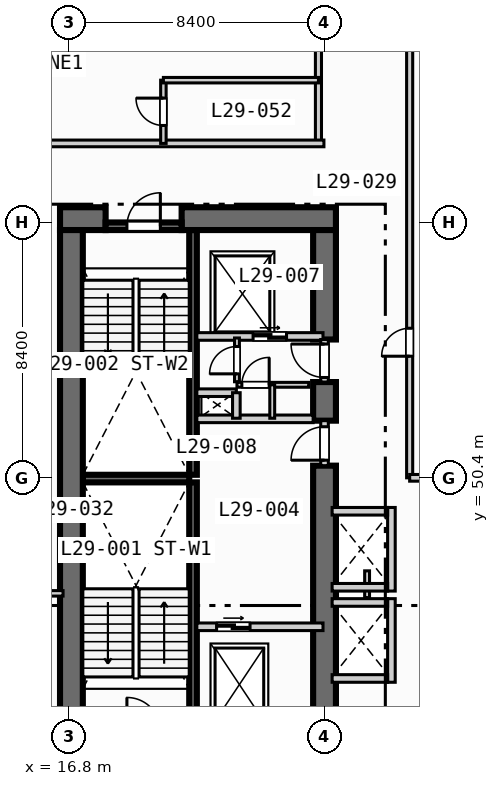
"""IFC4 building model, lengths in metres.
Left out: names, types, materials, properties, quantities, classifications, styles, units other than length and angle.
Written with IfcOpenShell. Run it as: python <this file> out.ifc"""

import sys

from ifc_helpers import new_model, si_unit, direction, frame, frame_2d, origin, place, context, subcontext, project, spatial, rectangle, extrude, element, fill, save


model = new_model("IFC4")
c1 = context("Model", 3, precision=1e-05, world=origin(), true_north=direction((0.0, 1.0)))
c2 = subcontext(c1, "Body", "Model", "MODEL_VIEW")
j1 = project(units=[si_unit("LENGTHUNIT", "METRE"), si_unit("PLANEANGLEUNIT", "RADIAN")], contexts=[c1])
p1 = place(None, origin())
s1 = spatial("IfcSite", under=j1, at=p1, CompositionType="ELEMENT")
p2 = place(p1, origin())
s2 = spatial("IfcBuilding", under=s1, at=p2, CompositionType="ELEMENT")
p3 = place(p2, frame((0.0, 0.0, 122.8)))
s3 = spatial("IfcBuildingStorey", under=s2, at=p3, CompositionType="ELEMENT", Elevation=122.8)
for number, where, z_axis, x_axis in (
    (1, (20.875, 42.2, 0.0), (0.0, 0.0, 1.0), (0.0, 1.0, 0.0)),
    (2, (20.875, 50.5, 0.0), (0.0, 0.0, 1.0), (0.0, 1.0, 0.0)),
):
    element("IfcWall", number, at=place(p3, frame(where, z_axis=z_axis, x_axis=x_axis)), inside=s3, PredefinedType="SOLIDWALL", context=c2, shape_type="SweptSolid", body=[
        extrude(rectangle(XDim=8.05, YDim=0.25, at=frame_2d((4.025, 0.0))), origin(), (0.0, 0.0, 1.0), 3.55),
    ])
p4 = place(p3, frame((17.25, 50.375, 0.0), z_axis=(0.0, 0.0, 1.0), x_axis=(1.0, 0.0, 0.0)))
e3 = element("IfcWall", 3, at=p4, inside=s3, PredefinedType="SOLIDWALL", context=c2, shape_type="SweptSolid", body=[
    extrude(rectangle(XDim=3.5, YDim=0.25, at=frame_2d((1.75, 0.0))), origin(), (0.0, 0.0, 1.0), 3.55),
])
p5 = place(p3, frame((16.5, 58.925, 0.0), z_axis=(0.0, 0.0, 1.0), x_axis=(1.0, 0.0, 0.0)))
e4 = element("IfcWall", 4, at=p5, inside=s3, PredefinedType="SHEAR", context=c2, shape_type="SweptSolid", body=[
    extrude(rectangle(XDim=1.5, YDim=0.75, at=frame_2d((0.75, 0.0))), origin(), (0.0, 0.0, 1.0), 3.55),
])
p6 = place(p3, frame((20.5, 58.925, 0.0), z_axis=(0.0, 0.0, 1.0), x_axis=(1.0, 0.0, 0.0)))
e5 = element("IfcWall", 5, at=p6, inside=s3, PredefinedType="SHEAR", context=c2, shape_type="SweptSolid", body=[
    extrude(rectangle(XDim=5.075, YDim=0.75, at=frame_2d((2.538, 0.0))), origin(), (0.0, 0.0, 1.0), 3.55),
])
p7 = place(p3, frame((16.875, 42.2, 0.0), z_axis=(0.0, 0.0, 1.0), x_axis=(0.0, 1.0, 0.0)))
e6 = element("IfcWall", 6, at=p7, inside=s3, PredefinedType="SHEAR", context=c2, shape_type="SweptSolid", body=[
    extrude(rectangle(XDim=16.35, YDim=0.75, at=frame_2d((8.175, 0.0))), origin(), (0.0, 0.0, 1.0), 3.55),
])
p8 = place(p3, frame((25.2, 42.2, 0.0), z_axis=(0.0, 0.0, 1.0), x_axis=(0.0, 1.0, 0.0)))
e7 = element("IfcWall", 7, at=p8, inside=s3, PredefinedType="SHEAR", context=c2, shape_type="SweptSolid", body=[
    extrude(rectangle(XDim=8.6, YDim=0.75, at=frame_2d((4.3, 0.0))), origin(), (0.0, 0.0, 1.0), 3.55),
])
p9 = place(p3, frame((25.2, 52.28, 0.0), z_axis=(0.0, 0.0, 1.0), x_axis=(0.0, 1.0, 0.0)))
e8 = element("IfcWall", 8, at=p9, inside=s3, PredefinedType="SHEAR", context=c2, shape_type="SweptSolid", body=[
    extrude(rectangle(XDim=1.27, YDim=0.75, at=frame_2d((0.635, 0.0))), origin(), (0.0, 0.0, 1.0), 3.55),
])
p10 = place(p3, frame((25.2, 54.95, 0.0), z_axis=(0.0, 0.0, 1.0), x_axis=(0.0, 1.0, 0.0)))
e9 = element("IfcWall", 9, at=p10, inside=s3, PredefinedType="SHEAR", context=c2, shape_type="SweptSolid", body=[
    extrude(rectangle(XDim=3.6, YDim=0.75, at=frame_2d((1.8, 0.0))), origin(), (0.0, 0.0, 1.0), 3.55),
])
p11 = place(p3, frame((18.0, 58.675, 0.0), z_axis=(0.0, 0.0, 1.0), x_axis=(1.0, 0.0, 0.0)))
e10 = element("IfcWall", 10, at=p11, inside=s3, PredefinedType="SOLIDWALL", context=c2, shape_type="SweptSolid", body=[
    extrude(rectangle(XDim=2.5, YDim=0.25, at=frame_2d((1.25, 0.0))), origin(), (0.0, 0.0, 1.0), 3.55),
])
p12 = place(p11, frame((0.7, 0.0, 0.0)))
e11 = element("IfcOpeningElement", 11, at=p12, cuts=e10, PredefinedType="OPENING", context=c2, shape_type="SweptSolid", body=[
    extrude(rectangle(XDim=1.1, YDim=2.15, at=frame_2d((0.55, 1.075))), frame((0.0, 0.135, 0.0), z_axis=(0.0, -1.0, 0.0), x_axis=(1.0, 0.0, 0.0)), (0.0, 0.0, 1.0), 0.27),
])
p13 = place(p3, frame((21.0, 45.5, 0.0), z_axis=(0.0, 0.0, 1.0), x_axis=(1.0, 0.0, 0.0)))
e12 = element("IfcWall", 12, at=p13, inside=s3, PredefinedType="SOLIDWALL", context=c2, shape_type="SweptSolid", body=[
    extrude(rectangle(XDim=4.15, YDim=0.25, at=frame_2d((2.075, 0.0))), origin(), (0.0, 0.0, 1.0), 3.55),
])
p14 = place(p13, frame((0.65, 0.0, 0.0)))
e13 = element("IfcOpeningElement", 13, at=p14, cuts=e12, PredefinedType="OPENING", context=c2, shape_type="SweptSolid", body=[
    extrude(rectangle(XDim=1.1, YDim=2.15, at=frame_2d((0.55, 1.075))), frame((0.0, 0.135, 0.0), z_axis=(0.0, -1.0, 0.0), x_axis=(1.0, 0.0, 0.0)), (0.0, 0.0, 1.0), 0.27),
])
p15 = place(p3, frame((25.2, 50.8, 0.0), z_axis=(0.0, 0.0, 1.0), x_axis=(0.0, 1.0, 0.0)))
e14 = element("IfcWall", 14, at=p15, inside=s3, PredefinedType="SOLIDWALL", context=c2, shape_type="SweptSolid", body=[
    extrude(rectangle(XDim=1.48, YDim=0.25, at=frame_2d((0.74, 0.0))), origin(), (0.0, 0.0, 1.0), 3.55),
])
p16 = place(p15, frame((0.18, 0.0, 0.0)))
e15 = element("IfcOpeningElement", 15, at=p16, cuts=e14, PredefinedType="OPENING", context=c2, shape_type="SweptSolid", body=[
    extrude(rectangle(XDim=1.1, YDim=2.15, at=frame_2d((0.55, 1.075))), frame((0.0, 0.135, 0.0), z_axis=(0.0, -1.0, 0.0), x_axis=(1.0, 0.0, 0.0)), (0.0, 0.0, 1.0), 0.27),
])
p17 = place(p3, frame((21.0, 52.34, 0.0), z_axis=(0.0, 0.0, 1.0), x_axis=(1.0, 0.0, 0.0)))
e16 = element("IfcWall", 16, at=p17, inside=s3, PredefinedType="SOLIDWALL", context=c2, shape_type="SweptSolid", body=[
    extrude(rectangle(XDim=3.825, YDim=0.25, at=frame_2d((1.913, 0.0))), origin(), (0.0, 0.0, 1.0), 3.55),
])
p18 = place(p3, frame((21.0, 55.05, 0.0), z_axis=(0.0, 0.0, 1.0), x_axis=(1.0, 0.0, 0.0)))
e17 = element("IfcWall", 17, at=p18, inside=s3, PredefinedType="SOLIDWALL", context=c2, shape_type="SweptSolid", body=[
    extrude(rectangle(XDim=4.15, YDim=0.25, at=frame_2d((2.075, 0.0))), origin(), (0.0, 0.0, 1.0), 3.55),
])
p19 = place(p18, frame((1.85, 0.0, 0.0)))
e18 = element("IfcOpeningElement", 18, at=p19, cuts=e17, PredefinedType="OPENING", context=c2, shape_type="SweptSolid", body=[
    extrude(rectangle(XDim=1.1, YDim=2.15, at=frame_2d((0.55, 1.075))), frame((0.0, 0.135, 0.0), z_axis=(0.0, -1.0, 0.0), x_axis=(1.0, 0.0, 0.0)), (0.0, 0.0, 1.0), 0.27),
])
p20 = place(p3, frame((25.2, 53.55, 0.0), z_axis=(0.0, 0.0, 1.0), x_axis=(0.0, 1.0, 0.0)))
e19 = element("IfcWall", 19, at=p20, inside=s3, PredefinedType="SOLIDWALL", context=c2, shape_type="SweptSolid", body=[
    extrude(rectangle(XDim=1.4, YDim=0.25, at=frame_2d((0.7, 0.0))), origin(), (0.0, 0.0, 1.0), 3.55),
])
p21 = place(p20, frame((0.15, 0.0, 0.0)))
e20 = element("IfcOpeningElement", 20, at=p21, cuts=e19, PredefinedType="OPENING", context=c2, shape_type="SweptSolid", body=[
    extrude(rectangle(XDim=1.1, YDim=2.15, at=frame_2d((0.55, 1.075))), frame((0.0, 0.135, 0.0), z_axis=(0.0, -1.0, 0.0), x_axis=(1.0, 0.0, 0.0)), (0.0, 0.0, 1.0), 0.27),
])
p22 = place(p3, frame((21.0, 53.2, 0.0), z_axis=(0.0, 0.0, 1.0), x_axis=(1.0, 0.0, 0.0)))
e21 = element("IfcWall", 21, at=p22, inside=s3, PredefinedType="SOLIDWALL", context=c2, shape_type="SweptSolid", body=[
    extrude(rectangle(XDim=1.3, YDim=0.25, at=frame_2d((0.65, 0.0))), origin(), (0.0, 0.0, 1.0), 3.55),
])
p23 = place(p3, frame((22.3, 52.36, 0.0), z_axis=(0.0, 0.0, 1.0), x_axis=(0.0, 1.0, 0.0)))
e22 = element("IfcWall", 22, at=p23, inside=s3, PredefinedType="SOLIDWALL", context=c2, shape_type="SweptSolid", body=[
    extrude(rectangle(XDim=0.84, YDim=0.25, at=frame_2d((0.42, 0.0))), origin(), (0.0, 0.0, 1.0), 3.55),
])
p24 = place(p3, frame((22.32, 53.56, 0.0), z_axis=(0.0, 0.0, 1.0), x_axis=(0.0, 1.0, 0.0)))
e23 = element("IfcWall", 23, at=p24, inside=s3, PredefinedType="PARTITIONING", context=c2, shape_type="SweptSolid", body=[
    extrude(rectangle(XDim=1.44, YDim=0.16, at=frame_2d((0.72, 0.0))), origin(), (0.0, 0.0, 1.0), 3.55),
])
p25 = place(p24, frame((0.26, 0.0, 0.0)))
e24 = element("IfcOpeningElement", 24, at=p25, cuts=e23, PredefinedType="OPENING", context=c2, shape_type="SweptSolid", body=[
    extrude(rectangle(XDim=0.9, YDim=2.1, at=frame_2d((0.45, 1.05))), frame((0.0, 0.09, 0.0), z_axis=(0.0, -1.0, 0.0), x_axis=(1.0, 0.0, 0.0)), (0.0, 0.0, 1.0), 0.18),
])
p26 = place(p3, frame((22.32, 53.46, 0.0), z_axis=(0.0, 0.0, 1.0), x_axis=(1.0, 0.0, 0.0)))
e25 = element("IfcWall", 25, at=p26, inside=s3, PredefinedType="PARTITIONING", context=c2, shape_type="SweptSolid", body=[
    extrude(rectangle(XDim=2.36, YDim=0.16, at=frame_2d((1.18, 0.0))), origin(), (0.0, 0.0, 1.0), 3.55),
])
p27 = place(p26, frame((0.16, 0.0, 0.0)))
e26 = element("IfcOpeningElement", 26, at=p27, cuts=e25, PredefinedType="OPENING", context=c2, shape_type="SweptSolid", body=[
    extrude(rectangle(XDim=0.9, YDim=2.1, at=frame_2d((0.45, 1.05))), frame((0.0, 0.09, 0.0), z_axis=(0.0, -1.0, 0.0), x_axis=(1.0, 0.0, 0.0)), (0.0, 0.0, 1.0), 0.18),
])
p28 = place(p3, frame((23.48, 52.36, 0.0), z_axis=(0.0, 0.0, 1.0), x_axis=(0.0, 1.0, 0.0)))
e27 = element("IfcWall", 27, at=p28, inside=s3, PredefinedType="PARTITIONING", context=c2, shape_type="SweptSolid", body=[
    extrude(rectangle(XDim=1.1, YDim=0.16, at=frame_2d((0.55, 0.0))), origin(), (0.0, 0.0, 1.0), 3.55),
])
p29 = place(p3, frame((27.4, 43.675, 0.0), z_axis=(0.0, 0.0, 1.0), x_axis=(0.0, 1.0, 0.0)))
e28 = element("IfcWall", 28, at=p29, inside=s3, PredefinedType="SOLIDWALL", context=c2, shape_type="SweptSolid", body=[
    extrude(rectangle(XDim=2.75, YDim=0.25, at=frame_2d((1.375, 0.0))), origin(), (0.0, 0.0, 1.0), 3.55),
])
for number, where, z_axis, x_axis in (
    (29, (25.45, 43.8, 0.0), (0.0, 0.0, 1.0), (1.0, 0.0, 0.0)),
    (30, (25.45, 46.3, 0.0), (0.0, 0.0, 1.0), (1.0, 0.0, 0.0)),
):
    element("IfcWall", number, at=place(p3, frame(where, z_axis=z_axis, x_axis=x_axis)), inside=s3, PredefinedType="SOLIDWALL", context=c2, shape_type="SweptSolid", body=[
        extrude(rectangle(XDim=1.825, YDim=0.25, at=frame_2d((0.913, 0.0))), origin(), (0.0, 0.0, 1.0), 3.55),
    ])
p30 = place(p3, frame((26.6, 46.46, 0.0), z_axis=(0.0, 0.0, 1.0), x_axis=(0.0, 1.0, 0.0)))
e31 = element("IfcWall", 31, at=p30, inside=s3, PredefinedType="PARTITIONING", context=c2, shape_type="SweptSolid", body=[
    extrude(rectangle(XDim=0.88, YDim=0.16, at=frame_2d((0.44, 0.0))), origin(), (0.0, 0.0, 1.0), 3.55),
])
p31 = place(p3, frame((27.4, 46.675, 0.0), z_axis=(0.0, 0.0, 1.0), x_axis=(0.0, 1.0, 0.0)))
e32 = element("IfcWall", 32, at=p31, inside=s3, PredefinedType="SOLIDWALL", context=c2, shape_type="SweptSolid", body=[
    extrude(rectangle(XDim=2.75, YDim=0.25, at=frame_2d((1.375, 0.0))), origin(), (0.0, 0.0, 1.0), 3.55),
])
for number, where, z_axis, x_axis in (
    (33, (25.45, 46.8, 0.0), (0.0, 0.0, 1.0), (1.0, 0.0, 0.0)),
    (34, (25.45, 49.3, 0.0), (0.0, 0.0, 1.0), (1.0, 0.0, 0.0)),
):
    element("IfcWall", number, at=place(p3, frame(where, z_axis=z_axis, x_axis=x_axis)), inside=s3, PredefinedType="SOLIDWALL", context=c2, shape_type="SweptSolid", body=[
        extrude(rectangle(XDim=1.825, YDim=0.25, at=frame_2d((0.913, 0.0))), origin(), (0.0, 0.0, 1.0), 3.55),
    ])
p32 = place(p3, frame((0.35, 49.2, 0.0), z_axis=(0.0, 0.0, 1.0), x_axis=(1.0, 0.0, 0.0)))
e35 = element("IfcWall", 35, at=p32, inside=s3, PredefinedType="PARTITIONING", context=c2, shape_type="SweptSolid", body=[
    extrude(rectangle(XDim=16.25, YDim=0.22, at=frame_2d((8.125, 0.0))), origin(), (0.0, 0.0, 1.0), 3.55),
])
p33 = place(p3, frame((13.6, 46.6, 0.0), z_axis=(0.0, 0.0, 1.0), x_axis=(1.0, 0.0, 0.0)))
e36 = element("IfcWall", 36, at=p33, inside=s3, PredefinedType="PLUMBINGWALL", context=c2, shape_type="SweptSolid", body=[
    extrude(rectangle(XDim=3.0, YDim=0.18, at=frame_2d((1.5, 0.0))), origin(), (0.0, 0.0, 1.0), 3.55),
])
p34 = place(p3, frame((25.0, 61.4, 0.0), z_axis=(0.0, 0.0, 1.0), x_axis=(0.0, 1.0, 0.0)))
e37 = element("IfcWall", 37, at=p34, inside=s3, PredefinedType="PARTITIONING", context=c2, shape_type="SweptSolid", body=[
    extrude(rectangle(XDim=27.6, YDim=0.2, at=frame_2d((13.8, 0.0))), origin(), (0.0, 0.0, 1.0), 2.8),
])
p35 = place(p34, frame((3.18, 0.0, 0.0)))
e38 = element("IfcOpeningElement", 38, at=p35, cuts=e37, PredefinedType="OPENING", context=c2, shape_type="SweptSolid", body=[
    extrude(rectangle(XDim=1.0, YDim=2.15, at=frame_2d((0.5, 1.075))), frame((0.0, 0.11, 0.0), z_axis=(0.0, -1.0, 0.0), x_axis=(1.0, 0.0, 0.0)), (0.0, 0.0, 1.0), 0.22),
])
p36 = place(p34, frame((6.97, 0.0, 0.0)))
e39 = element("IfcOpeningElement", 39, at=p36, cuts=e37, PredefinedType="OPENING", context=c2, shape_type="SweptSolid", body=[
    extrude(rectangle(XDim=1.0, YDim=2.15, at=frame_2d((0.5, 1.075))), frame((0.0, 0.11, 0.0), z_axis=(0.0, -1.0, 0.0), x_axis=(1.0, 0.0, 0.0)), (0.0, 0.0, 1.0), 0.22),
])
p37 = place(p34, frame((12.035, 0.0, 0.0)))
e40 = element("IfcOpeningElement", 40, at=p37, cuts=e37, PredefinedType="OPENING", context=c2, shape_type="SweptSolid", body=[
    extrude(rectangle(XDim=1.0, YDim=2.15, at=frame_2d((0.5, 1.075))), frame((0.0, 0.11, 0.0), z_axis=(0.0, -1.0, 0.0), x_axis=(1.0, 0.0, 0.0)), (0.0, 0.0, 1.0), 0.22),
])
p38 = place(p34, frame((20.385, 0.0, 0.0)))
e41 = element("IfcOpeningElement", 41, at=p38, cuts=e37, PredefinedType="OPENING", context=c2, shape_type="SweptSolid", body=[
    extrude(rectangle(XDim=1.0, YDim=2.15, at=frame_2d((0.5, 1.075))), frame((0.0, 0.11, 0.0), z_axis=(0.0, -1.0, 0.0), x_axis=(1.0, 0.0, 0.0)), (0.0, 0.0, 1.0), 0.22),
])
p39 = place(p3, frame((0.2, 61.4, 0.0), z_axis=(0.0, 0.0, 1.0), x_axis=(1.0, 0.0, 0.0)))
e42 = element("IfcWall", 42, at=p39, inside=s3, PredefinedType="PARTITIONING", context=c2, shape_type="SweptSolid", body=[
    extrude(rectangle(XDim=24.98, YDim=0.22, at=frame_2d((12.49, 0.0))), origin(), (0.0, 0.0, 1.0), 3.55),
])
p40 = place(p3, frame((19.9, 61.4, 0.0), z_axis=(0.0, 0.0, 1.0), x_axis=(0.0, 1.0, 0.0)))
e43 = element("IfcWall", 43, at=p40, inside=s3, PredefinedType="PLUMBINGWALL", context=c2, shape_type="SweptSolid", body=[
    extrude(rectangle(XDim=2.08, YDim=0.18, at=frame_2d((1.04, 0.0))), origin(), (0.0, 0.0, 1.0), 3.55),
])
p41 = place(p40, frame((0.59, 0.0, 0.0)))
e44 = element("IfcOpeningElement", 44, at=p41, cuts=e43, PredefinedType="OPENING", context=c2, shape_type="SweptSolid", body=[
    extrude(rectangle(XDim=0.9, YDim=2.1, at=frame_2d((0.45, 1.05))), frame((0.0, 0.1, 0.0), z_axis=(0.0, -1.0, 0.0), x_axis=(1.0, 0.0, 0.0)), (0.0, 0.0, 1.0), 0.2),
])
p42 = place(p3, frame((19.9, 63.48, 0.0), z_axis=(0.0, 0.0, 1.0), x_axis=(1.0, 0.0, 0.0)))
e45 = element("IfcWall", 45, at=p42, inside=s3, PredefinedType="PLUMBINGWALL", context=c2, shape_type="SweptSolid", body=[
    extrude(rectangle(XDim=5.1, YDim=0.18, at=frame_2d((2.55, 0.0))), origin(), (0.0, 0.0, 1.0), 3.55),
])
p43 = place(p3, frame((28.0, 50.4, 0.0), z_axis=(0.0, 0.0, 1.0), x_axis=(0.0, 1.0, 0.0)))
e46 = element("IfcWall", 46, at=p43, inside=s3, PredefinedType="PARTITIONING", context=c2, shape_type="SweptSolid", body=[
    extrude(rectangle(XDim=38.6, YDim=0.2, at=frame_2d((19.3, 0.0))), origin(), (0.0, 0.0, 1.0), 3.55),
])
p44 = place(p43, frame((4.0, 0.0, 0.0)))
e47 = element("IfcOpeningElement", 47, at=p44, cuts=e46, PredefinedType="OPENING", context=c2, shape_type="SweptSolid", body=[
    extrude(rectangle(XDim=0.92, YDim=2.1, at=frame_2d((0.46, 1.05))), frame((0.0, 0.11, 0.0), z_axis=(0.0, -1.0, 0.0), x_axis=(1.0, 0.0, 0.0)), (0.0, 0.0, 1.0), 0.22),
])
p45 = place(p3, frame((28.0, 50.4, 0.0), z_axis=(0.0, 0.0, 1.0), x_axis=(1.0, 0.0, 0.0)))
e48 = element("IfcWall", 48, at=p45, inside=s3, PredefinedType="PARTITIONING", context=c2, shape_type="SweptSolid", body=[
    extrude(rectangle(XDim=5.3, YDim=0.22, at=frame_2d((2.65, 0.0))), origin(), (0.0, 0.0, 1.0), 2.8),
])
p46 = place(p12, origin())
e49 = element("IfcDoor", 49, at=p46, inside=s3, OperationType="SINGLE_SWING_RIGHT", PredefinedType="DOOR", context=c2, shape_type="SweptSolid", body=[
    extrude(rectangle(XDim=1.1, YDim=2.15, at=frame_2d((0.55, 1.075))), frame((0.0, 0.025, 0.0), z_axis=(0.0, -1.0, 0.0), x_axis=(1.0, 0.0, 0.0)), (0.0, 0.0, 1.0), 0.05),
])
fill(e11, e49)
p47 = place(p14, origin())
e50 = element("IfcDoor", 50, at=p47, inside=s3, OperationType="SLIDING_TO_LEFT", PredefinedType="DOOR", context=c2, shape_type="SweptSolid", body=[
    extrude(rectangle(XDim=1.1, YDim=2.15, at=frame_2d((0.55, 1.075))), frame((0.0, 0.025, 0.0), z_axis=(0.0, -1.0, 0.0), x_axis=(1.0, 0.0, 0.0)), (0.0, 0.0, 1.0), 0.05),
])
fill(e13, e50)
p48 = place(p16, origin())
e51 = element("IfcDoor", 51, at=p48, inside=s3, OperationType="SINGLE_SWING_LEFT", PredefinedType="DOOR", context=c2, shape_type="SweptSolid", body=[
    extrude(rectangle(XDim=1.1, YDim=2.15, at=frame_2d((0.55, 1.075))), frame((0.0, 0.025, 0.0), z_axis=(0.0, -1.0, 0.0), x_axis=(1.0, 0.0, 0.0)), (0.0, 0.0, 1.0), 0.05),
])
fill(e15, e51)
p49 = place(p19, origin())
e52 = element("IfcDoor", 52, at=p49, inside=s3, OperationType="SLIDING_TO_LEFT", PredefinedType="DOOR", context=c2, shape_type="SweptSolid", body=[
    extrude(rectangle(XDim=1.1, YDim=2.15, at=frame_2d((0.55, 1.075))), frame((0.0, 0.025, 0.0), z_axis=(0.0, -1.0, 0.0), x_axis=(1.0, 0.0, 0.0)), (0.0, 0.0, 1.0), 0.05),
])
fill(e18, e52)
p50 = place(p21, origin())
e53 = element("IfcDoor", 53, at=p50, inside=s3, OperationType="SINGLE_SWING_RIGHT", PredefinedType="DOOR", context=c2, shape_type="SweptSolid", body=[
    extrude(rectangle(XDim=1.1, YDim=2.15, at=frame_2d((0.55, 1.075))), frame((0.0, 0.025, 0.0), z_axis=(0.0, -1.0, 0.0), x_axis=(1.0, 0.0, 0.0)), (0.0, 0.0, 1.0), 0.05),
])
fill(e20, e53)
p51 = place(p25, origin())
e54 = element("IfcDoor", 54, at=p51, inside=s3, OperationType="SINGLE_SWING_LEFT", PredefinedType="DOOR", context=c2, shape_type="SweptSolid", body=[
    extrude(rectangle(XDim=0.9, YDim=2.1, at=frame_2d((0.45, 1.05))), frame((0.0, 0.025, 0.0), z_axis=(0.0, -1.0, 0.0), x_axis=(1.0, 0.0, 0.0)), (0.0, 0.0, 1.0), 0.05),
])
fill(e24, e54)
p52 = place(p27, origin())
e55 = element("IfcDoor", 55, at=p52, inside=s3, OperationType="SINGLE_SWING_RIGHT", PredefinedType="DOOR", context=c2, shape_type="SweptSolid", body=[
    extrude(rectangle(XDim=0.9, YDim=2.1, at=frame_2d((0.45, 1.05))), frame((0.0, 0.025, 0.0), z_axis=(0.0, -1.0, 0.0), x_axis=(1.0, 0.0, 0.0)), (0.0, 0.0, 1.0), 0.05),
])
fill(e26, e55)
p53 = place(p41, origin())
e56 = element("IfcDoor", 56, at=p53, inside=s3, OperationType="SINGLE_SWING_RIGHT", PredefinedType="DOOR", context=c2, shape_type="SweptSolid", body=[
    extrude(rectangle(XDim=0.9, YDim=2.1, at=frame_2d((0.45, 1.05))), frame((0.0, 0.025, 0.0), z_axis=(0.0, -1.0, 0.0), x_axis=(1.0, 0.0, 0.0)), (0.0, 0.0, 1.0), 0.05),
])
fill(e44, e56)
p54 = place(p44, origin())
e57 = element("IfcDoor", 57, at=p54, inside=s3, OperationType="SINGLE_SWING_LEFT", PredefinedType="DOOR", context=c2, shape_type="SweptSolid", body=[
    extrude(rectangle(XDim=0.92, YDim=2.1, at=frame_2d((0.46, 1.05))), frame((0.0, 0.025, 0.0), z_axis=(0.0, -1.0, 0.0), x_axis=(1.0, 0.0, 0.0)), (0.0, 0.0, 1.0), 0.05),
])
fill(e47, e57)
save(model, sys.argv[1])
